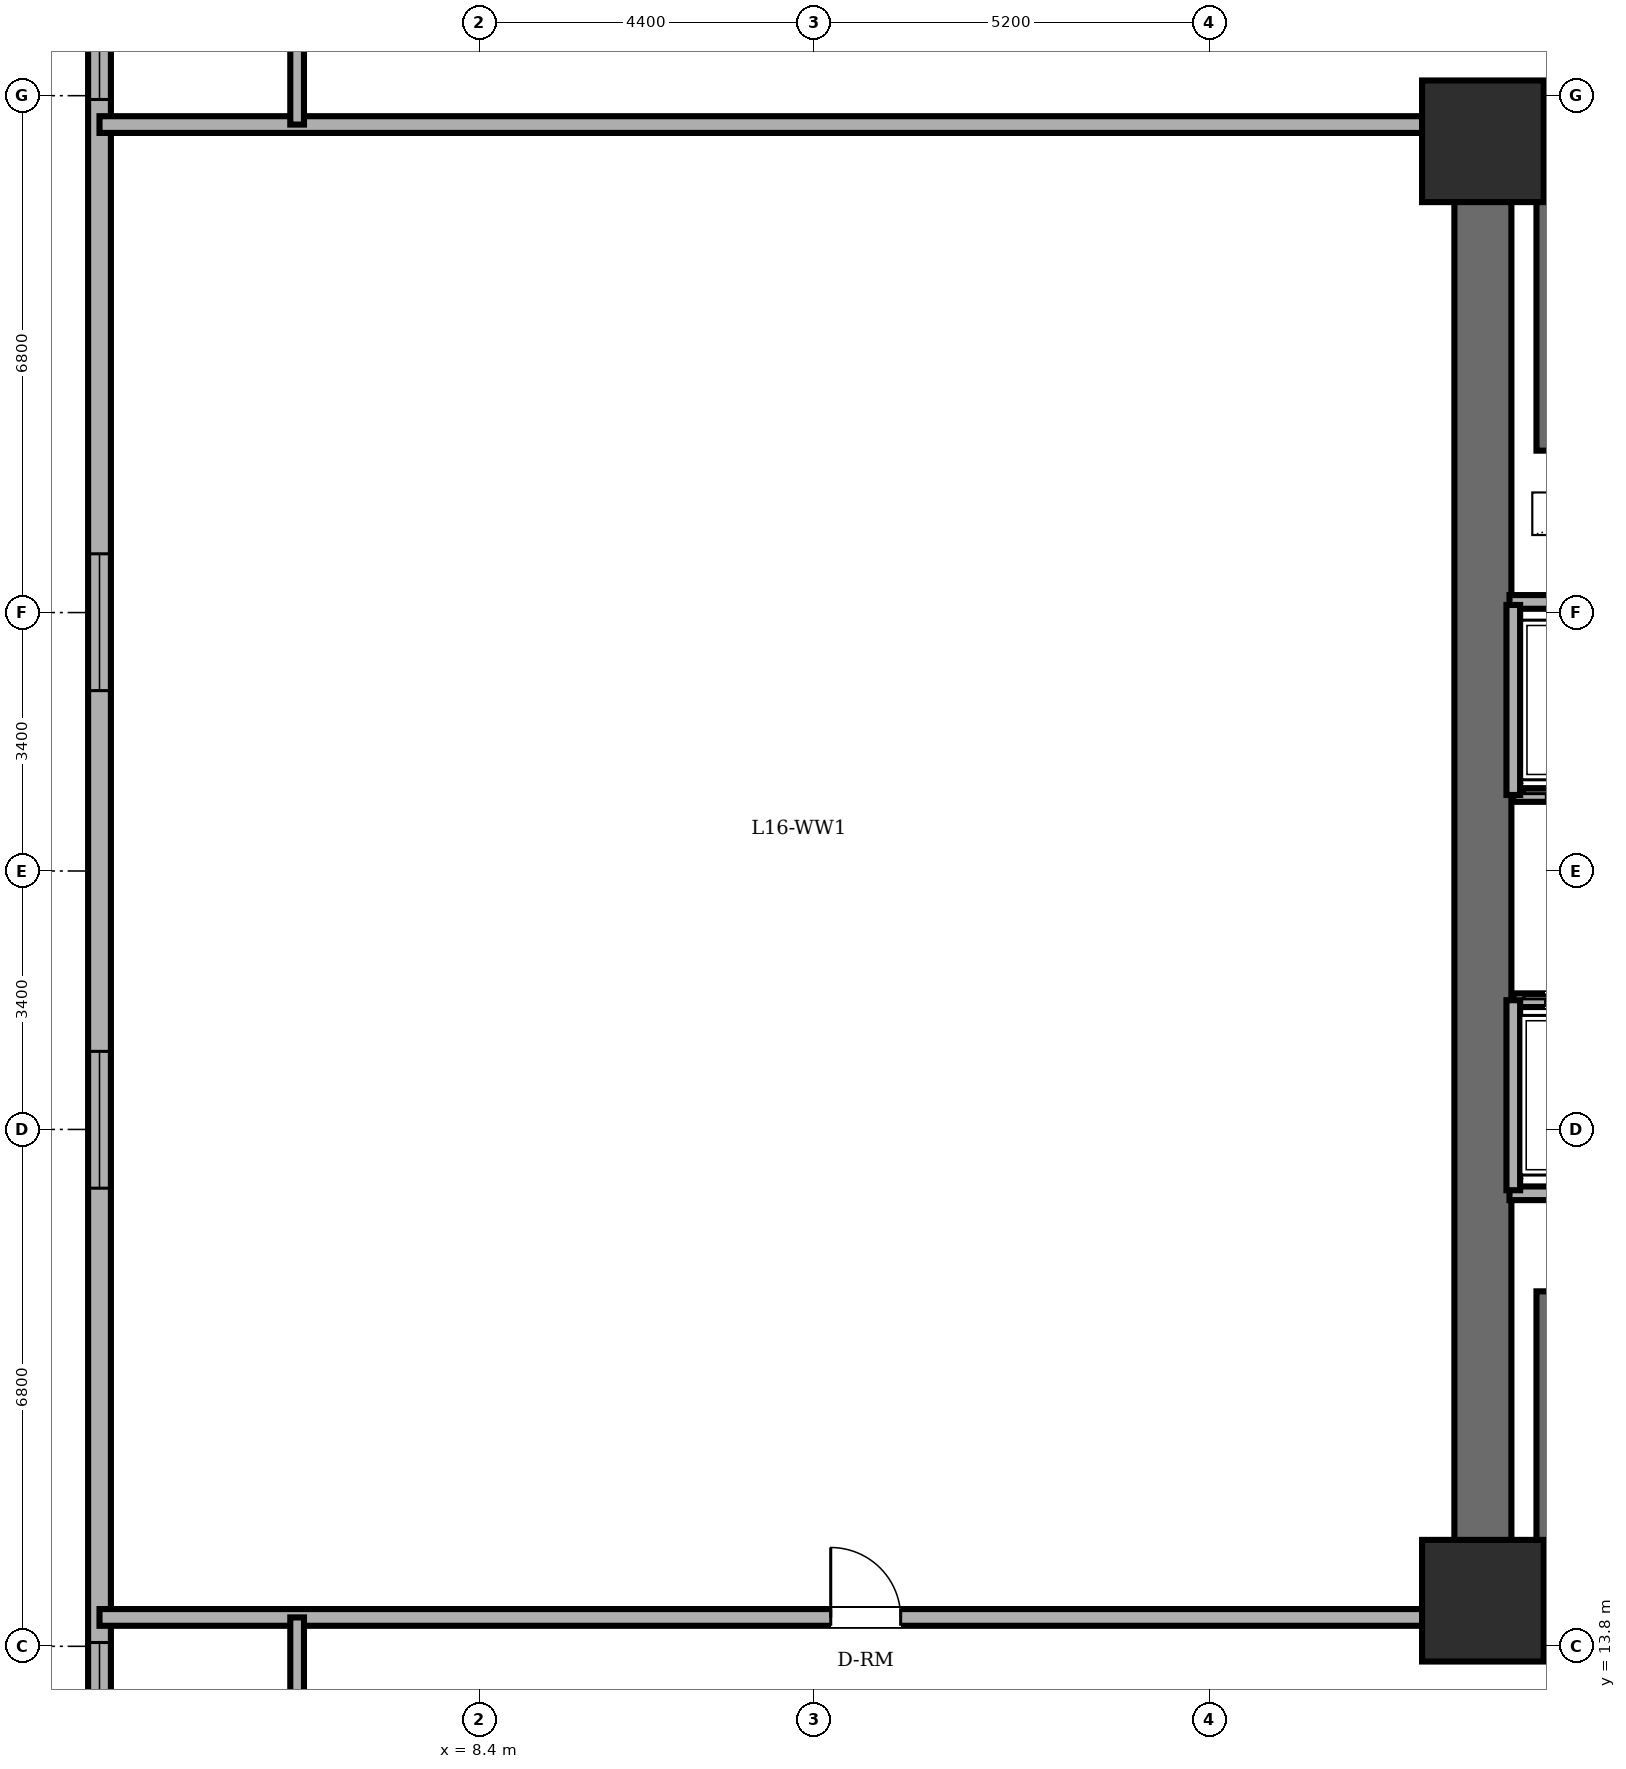
"""IFC4 building model, lengths in metres.
Left out: names, types, materials, properties, quantities, classifications, styles, units other than length and angle.
Written with IfcOpenShell. Run it as: python <this file> out.ifc"""

import sys

from ifc_helpers import new_model, si_unit, direction, frame, frame_2d, origin, origin_2d, place, context, subcontext, project, spatial, rectangle, extrude, element, fill, save


model = new_model("IFC4")
c1 = context("Model", 3, precision=1e-05, world=origin(), true_north=direction((0.0, 1.0)))
c2 = subcontext(c1, "Body", "Model", "MODEL_VIEW")
j1 = project(units=[si_unit("LENGTHUNIT", "METRE"), si_unit("PLANEANGLEUNIT", "RADIAN")], contexts=[c1])
p1 = place(None, origin())
s1 = spatial("IfcSite", under=j1, at=p1, CompositionType="ELEMENT")
p2 = place(p1, origin())
s2 = spatial("IfcBuilding", under=s1, at=p2, CompositionType="ELEMENT")
p3 = place(p2, frame((0.0, 0.0, 61.2)))
s3 = spatial("IfcBuildingStorey", under=s2, at=p3, CompositionType="ELEMENT", Elevation=61.2)
for number, where, z_axis, x_axis in (
    (1, (21.6, 14.4, 0.0), (0.0, 0.0, 1.0), (1.0, 0.0, 0.0)),
    (2, (21.6, 33.6, 0.0), (0.0, 0.0, 1.0), (1.0, 0.0, 0.0)),
):
    element("IfcColumn", number, at=place(p3, frame(where, z_axis=z_axis, x_axis=x_axis)), inside=s3, PredefinedType="COLUMN", context=c2, shape_type="SweptSolid", body=[
        extrude(rectangle(XDim=1.6, YDim=1.6, at=origin_2d()), origin(), (0.0, 0.0, 1.0), 3.6),
    ])
p4 = place(p3, frame((3.4, 40.2, 0.0), z_axis=(0.0, 0.0, 1.0), x_axis=(0.0, -1.0, 0.0)))
e3 = element("IfcWall", 3, at=p4, inside=s3, PredefinedType="SOLIDWALL", context=c2, shape_type="SweptSolid", body=[
    extrude(rectangle(XDim=32.4, YDim=0.3, at=frame_2d((16.2, 0.0))), origin(), (0.0, 0.0, 1.0), 3.4),
])
p5 = place(p4, frame((1.235, 0.0, 0.85)))
e4 = element("IfcOpeningElement", 4, at=p5, cuts=e3, PredefinedType="OPENING", context=c2, shape_type="SweptSolid", body=[
    extrude(rectangle(XDim=1.8, YDim=1.55, at=frame_2d((0.9, 0.775))), frame((0.0, 0.16, 0.0), z_axis=(0.0, -1.0, 0.0), x_axis=(1.0, 0.0, 0.0)), (0.0, 0.0, 1.0), 0.32),
])
p6 = place(p4, frame((4.25, 0.0, 0.85)))
e5 = element("IfcOpeningElement", 5, at=p6, cuts=e3, PredefinedType="OPENING", context=c2, shape_type="SweptSolid", body=[
    extrude(rectangle(XDim=1.8, YDim=1.55, at=frame_2d((0.9, 0.775))), frame((0.0, 0.16, 0.0), z_axis=(0.0, -1.0, 0.0), x_axis=(1.0, 0.0, 0.0)), (0.0, 0.0, 1.0), 0.32),
])
p7 = place(p4, frame((12.027, 0.0, 0.85)))
e6 = element("IfcOpeningElement", 6, at=p7, cuts=e3, PredefinedType="OPENING", context=c2, shape_type="SweptSolid", body=[
    extrude(rectangle(XDim=1.8, YDim=1.55, at=frame_2d((0.9, 0.775))), frame((0.0, 0.16, 0.0), z_axis=(0.0, -1.0, 0.0), x_axis=(1.0, 0.0, 0.0)), (0.0, 0.0, 1.0), 0.32),
])
p8 = place(p4, frame((18.573, 0.0, 0.85)))
e7 = element("IfcOpeningElement", 7, at=p8, cuts=e3, PredefinedType="OPENING", context=c2, shape_type="SweptSolid", body=[
    extrude(rectangle(XDim=1.8, YDim=1.55, at=frame_2d((0.9, 0.775))), frame((0.0, 0.16, 0.0), z_axis=(0.0, -1.0, 0.0), x_axis=(1.0, 0.0, 0.0)), (0.0, 0.0, 1.0), 0.32),
])
p9 = place(p4, frame((26.35, 0.0, 0.85)))
e8 = element("IfcOpeningElement", 8, at=p9, cuts=e3, PredefinedType="OPENING", context=c2, shape_type="SweptSolid", body=[
    extrude(rectangle(XDim=1.8, YDim=1.55, at=frame_2d((0.9, 0.775))), frame((0.0, 0.16, 0.0), z_axis=(0.0, -1.0, 0.0), x_axis=(1.0, 0.0, 0.0)), (0.0, 0.0, 1.0), 0.32),
])
p10 = place(p4, frame((29.365, 0.0, 0.85)))
e9 = element("IfcOpeningElement", 9, at=p10, cuts=e3, PredefinedType="OPENING", context=c2, shape_type="SweptSolid", body=[
    extrude(rectangle(XDim=1.8, YDim=1.55, at=frame_2d((0.9, 0.775))), frame((0.0, 0.16, 0.0), z_axis=(0.0, -1.0, 0.0), x_axis=(1.0, 0.0, 0.0)), (0.0, 0.0, 1.0), 0.32),
])
p11 = place(p3, frame((21.6, 14.4, 0.0), z_axis=(0.0, 0.0, 1.0), x_axis=(0.0, 1.0, 0.0)))
e10 = element("IfcWall", 10, at=p11, inside=s3, PredefinedType="SHEAR", context=c2, shape_type="SweptSolid", body=[
    extrude(rectangle(XDim=19.2, YDim=0.75, at=frame_2d((9.6, 0.0))), origin(), (0.0, 0.0, 1.0), 3.4),
])
for number, where, z_axis, x_axis in (
    (11, (21.6, 33.6, 0.0), (0.0, 0.0, 1.0), (1.0, 0.0, 0.0)),
    (12, (37.2, 14.4, 0.0), (0.0, 0.0, 1.0), (-1.0, 0.0, 0.0)),
):
    element("IfcWall", number, at=place(p3, frame(where, z_axis=z_axis, x_axis=x_axis)), inside=s3, PredefinedType="SHEAR", context=c2, shape_type="SweptSolid", body=[
        extrude(rectangle(XDim=15.6, YDim=0.75, at=frame_2d((7.8, 0.0))), origin(), (0.0, 0.0, 1.0), 3.4),
    ])
for number, where, z_axis, x_axis in (
    (13, (22.48, 29.53, 0.0), (0.0, 0.0, 1.0), (0.0, 1.0, 0.0)),
    (14, (22.48, 14.89, 0.0), (0.0, 0.0, 1.0), (0.0, 1.0, 0.0)),
):
    element("IfcWall", number, at=place(p3, frame(where, z_axis=z_axis, x_axis=x_axis)), inside=s3, PredefinedType="SOLIDWALL", context=c2, shape_type="SweptSolid", body=[
        extrude(rectangle(XDim=3.58, YDim=0.35, at=frame_2d((1.79, 0.0))), origin(), (0.0, 0.0, 1.0), 3.4),
    ])
p12 = place(p3, frame((21.95, 27.54, 0.0), z_axis=(0.0, 0.0, 1.0), x_axis=(1.0, 0.0, 0.0)))
e15 = element("IfcWall", 15, at=p12, inside=s3, PredefinedType="PARTITIONING", context=c2, shape_type="SweptSolid", body=[
    extrude(rectangle(XDim=10.56, YDim=0.18, at=frame_2d((5.28, 0.0))), origin(), (0.0, 0.0, 1.0), 3.4),
])
p13 = place(p3, frame((21.95, 19.76, 0.0), z_axis=(0.0, 0.0, 1.0), x_axis=(1.0, 0.0, 0.0)))
e16 = element("IfcWall", 16, at=p13, inside=s3, PredefinedType="PARTITIONING", context=c2, shape_type="SweptSolid", body=[
    extrude(rectangle(XDim=14.87, YDim=0.18, at=frame_2d((7.435, 0.0))), origin(), (0.0, 0.0, 1.0), 3.4),
])
p14 = place(p3, frame((24.02, 25.0, 0.0), z_axis=(0.0, 0.0, 1.0), x_axis=(-1.0, 0.0, 0.0)))
e17 = element("IfcWall", 17, at=p14, inside=s3, PredefinedType="PARTITIONING", context=c2, shape_type="SweptSolid", body=[
    extrude(rectangle(XDim=2.02, YDim=0.18, at=frame_2d((1.01, 0.0))), origin(), (0.0, 0.0, 1.0), 3.4),
])
p15 = place(p14, frame((0.435, 0.0, 0.0)))
e18 = element("IfcOpeningElement", 18, at=p15, cuts=e17, PredefinedType="OPENING", context=c2, shape_type="SweptSolid", body=[
    extrude(rectangle(XDim=1.15, YDim=2.2, at=frame_2d((0.575, 1.1))), frame((0.0, 0.1, 0.0), z_axis=(0.0, -1.0, 0.0), x_axis=(1.0, 0.0, 0.0)), (0.0, 0.0, 1.0), 0.2),
])
p16 = place(p3, frame((22.0, 27.5, 0.0), z_axis=(0.0, 0.0, 1.0), x_axis=(0.0, -1.0, 0.0)))
e19 = element("IfcWall", 19, at=p16, inside=s3, PredefinedType="PARTITIONING", context=c2, shape_type="SweptSolid", body=[
    extrude(rectangle(XDim=2.5, YDim=0.18, at=frame_2d((1.25, 0.0))), origin(), (0.0, 0.0, 1.0), 3.4),
])
p17 = place(p3, frame((22.0, 22.3, 0.0), z_axis=(0.0, 0.0, 1.0), x_axis=(1.0, 0.0, 0.0)))
e20 = element("IfcWall", 20, at=p17, inside=s3, PredefinedType="PARTITIONING", context=c2, shape_type="SweptSolid", body=[
    extrude(rectangle(XDim=2.0, YDim=0.18, at=frame_2d((1.0, 0.0))), origin(), (0.0, 0.0, 1.0), 3.4),
])
p18 = place(p17, frame((0.425, 0.0, 0.0)))
e21 = element("IfcOpeningElement", 21, at=p18, cuts=e20, PredefinedType="OPENING", context=c2, shape_type="SweptSolid", body=[
    extrude(rectangle(XDim=1.15, YDim=2.2, at=frame_2d((0.575, 1.1))), frame((0.0, 0.1, 0.0), z_axis=(0.0, -1.0, 0.0), x_axis=(1.0, 0.0, 0.0)), (0.0, 0.0, 1.0), 0.2),
])
p19 = place(p3, frame((22.0, 22.3, 0.0), z_axis=(0.0, 0.0, 1.0), x_axis=(0.0, -1.0, 0.0)))
e22 = element("IfcWall", 22, at=p19, inside=s3, PredefinedType="PARTITIONING", context=c2, shape_type="SweptSolid", body=[
    extrude(rectangle(XDim=2.5, YDim=0.18, at=frame_2d((1.25, 0.0))), origin(), (0.0, 0.0, 1.0), 3.4),
])
p20 = place(p3, frame((3.4, 14.18, 0.0), z_axis=(0.0, 0.0, 1.0), x_axis=(1.0, 0.0, 0.0)))
e23 = element("IfcWall", 23, at=p20, inside=s3, PredefinedType="PARTITIONING", context=c2, shape_type="SweptSolid", body=[
    extrude(rectangle(XDim=18.08, YDim=0.22, at=frame_2d((9.04, 0.0))), origin(), (0.0, 0.0, 1.0), 3.4),
])
p21 = place(p20, frame((9.62, 0.0, 0.0)))
e24 = element("IfcOpeningElement", 24, at=p21, cuts=e23, PredefinedType="OPENING", context=c2, shape_type="SweptSolid", body=[
    extrude(rectangle(XDim=0.92, YDim=2.1, at=frame_2d((0.46, 1.05))), frame((0.0, 0.12, 0.0), z_axis=(0.0, -1.0, 0.0), x_axis=(1.0, 0.0, 0.0)), (0.0, 0.0, 1.0), 0.24),
])
p22 = place(p3, frame((3.4, 33.82, 0.0), z_axis=(0.0, 0.0, 1.0), x_axis=(1.0, 0.0, 0.0)))
e25 = element("IfcWall", 25, at=p22, inside=s3, PredefinedType="PARTITIONING", context=c2, shape_type="SweptSolid", body=[
    extrude(rectangle(XDim=18.08, YDim=0.22, at=frame_2d((9.04, 0.0))), origin(), (0.0, 0.0, 1.0), 3.4),
])
for number, where, z_axis, x_axis in (
    (26, (6.0, 11.72, 0.0), (0.0, 0.0, 1.0), (0.0, 1.0, 0.0)),
    (27, (6.0, 33.82, 0.0), (0.0, 0.0, 1.0), (0.0, 1.0, 0.0)),
):
    element("IfcWall", number, at=place(p3, frame(where, z_axis=z_axis, x_axis=x_axis)), inside=s3, PredefinedType="PARTITIONING", context=c2, shape_type="SweptSolid", body=[
        extrude(rectangle(XDim=2.46, YDim=0.18, at=frame_2d((1.23, 0.0))), origin(), (0.0, 0.0, 1.0), 3.4),
    ])
p23 = place(p6, origin())
e28 = element("IfcWindow", 28, at=p23, inside=s3, PartitioningType="DOUBLE_PANEL_VERTICAL", PredefinedType="WINDOW", context=c2, shape_type="SweptSolid", body=[
    extrude(rectangle(XDim=1.8, YDim=1.55, at=frame_2d((0.9, 0.775))), frame((0.0, 0.03, 0.0), z_axis=(0.0, -1.0, 0.0), x_axis=(1.0, 0.0, 0.0)), (0.0, 0.0, 1.0), 0.06),
])
fill(e5, e28)
p24 = place(p7, origin())
e29 = element("IfcWindow", 29, at=p24, inside=s3, PartitioningType="DOUBLE_PANEL_VERTICAL", PredefinedType="WINDOW", context=c2, shape_type="SweptSolid", body=[
    extrude(rectangle(XDim=1.8, YDim=1.55, at=frame_2d((0.9, 0.775))), frame((0.0, 0.03, 0.0), z_axis=(0.0, -1.0, 0.0), x_axis=(1.0, 0.0, 0.0)), (0.0, 0.0, 1.0), 0.06),
])
fill(e6, e29)
p25 = place(p8, origin())
e30 = element("IfcWindow", 30, at=p25, inside=s3, PartitioningType="DOUBLE_PANEL_VERTICAL", PredefinedType="WINDOW", context=c2, shape_type="SweptSolid", body=[
    extrude(rectangle(XDim=1.8, YDim=1.55, at=frame_2d((0.9, 0.775))), frame((0.0, 0.03, 0.0), z_axis=(0.0, -1.0, 0.0), x_axis=(1.0, 0.0, 0.0)), (0.0, 0.0, 1.0), 0.06),
])
fill(e7, e30)
p26 = place(p9, origin())
e31 = element("IfcWindow", 31, at=p26, inside=s3, PartitioningType="DOUBLE_PANEL_VERTICAL", PredefinedType="WINDOW", context=c2, shape_type="SweptSolid", body=[
    extrude(rectangle(XDim=1.8, YDim=1.55, at=frame_2d((0.9, 0.775))), frame((0.0, 0.03, 0.0), z_axis=(0.0, -1.0, 0.0), x_axis=(1.0, 0.0, 0.0)), (0.0, 0.0, 1.0), 0.06),
])
fill(e8, e31)
p27 = place(p18, origin())
e32 = element("IfcDoor", 32, at=p27, inside=s3, OperationType="DOUBLE_DOOR_SLIDING", PredefinedType="DOOR", context=c2, shape_type="SweptSolid", body=[
    extrude(rectangle(XDim=1.15, YDim=2.2, at=frame_2d((0.575, 1.1))), frame((0.0, 0.025, 0.0), z_axis=(0.0, -1.0, 0.0), x_axis=(1.0, 0.0, 0.0)), (0.0, 0.0, 1.0), 0.05),
])
fill(e21, e32)
p28 = place(p21, origin())
e33 = element("IfcDoor", 33, at=p28, inside=s3, OperationType="SINGLE_SWING_LEFT", PredefinedType="DOOR", context=c2, shape_type="SweptSolid", body=[
    extrude(rectangle(XDim=0.92, YDim=2.1, at=frame_2d((0.46, 1.05))), frame((0.0, 0.025, 0.0), z_axis=(0.0, -1.0, 0.0), x_axis=(1.0, 0.0, 0.0)), (0.0, 0.0, 1.0), 0.05),
])
fill(e24, e33)
save(model, sys.argv[1])
